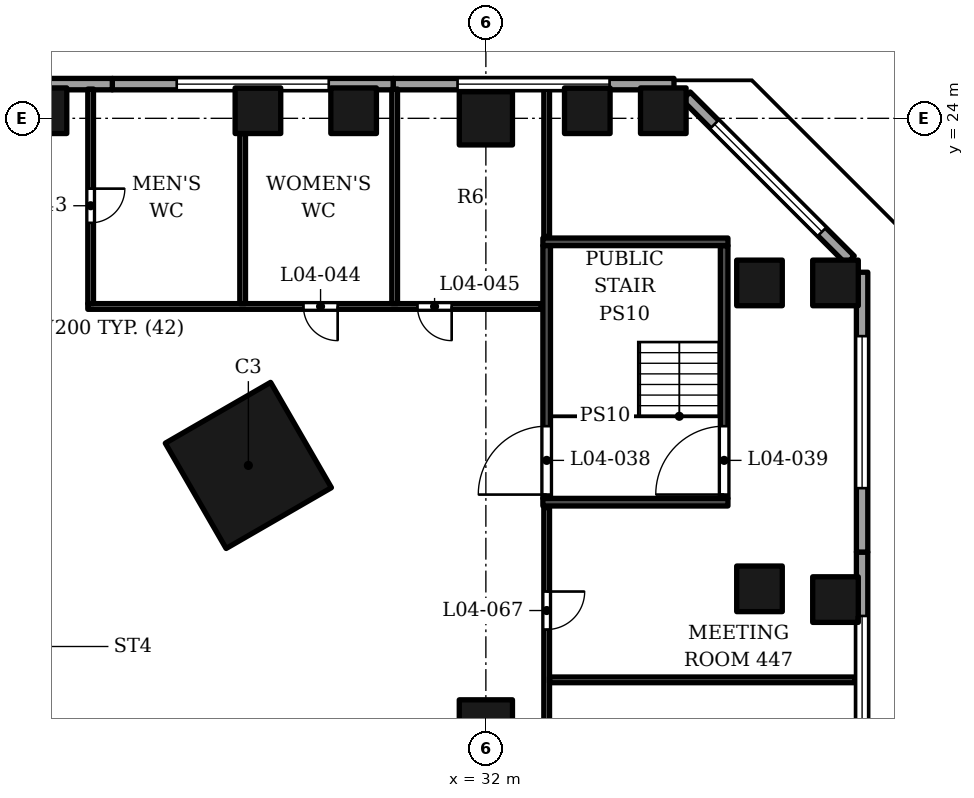
"""IFC4 building model, lengths in metres.
Left out: names, types, materials, properties, quantities, classifications, styles, units other than length and angle.
Written with IfcOpenShell. Run it as: python <this file> out.ifc"""

import sys

from ifc_helpers import new_model, si_unit, direction, frame, frame_2d, origin, origin_2d, place, context, subcontext, project, spatial, rectangle, extrude, element, fill, save


model = new_model("IFC4")
c1 = context("Model", 3, precision=1e-05, world=origin(), true_north=direction((0.0, 1.0)))
c2 = subcontext(c1, "Body", "Model", "MODEL_VIEW")
j1 = project(units=[si_unit("LENGTHUNIT", "METRE"), si_unit("PLANEANGLEUNIT", "RADIAN")], contexts=[c1])
p1 = place(None, origin())
s1 = spatial("IfcSite", under=j1, at=p1, CompositionType="ELEMENT")
p2 = place(p1, origin())
s2 = spatial("IfcBuilding", under=s1, at=p2, CompositionType="ELEMENT")
p3 = place(p2, frame((0.0, 0.0, 34.5)))
s3 = spatial("IfcBuildingStorey", under=s2, at=p3, CompositionType="ELEMENT", Elevation=34.5)
for number, where, z_axis, x_axis in (
    (1, (32.0, 8.0, 0.0), (0.0, 0.0, 1.0), (1.0, 0.0, 0.0)),
    (2, (32.0, 24.0, 0.0), (0.0, 0.0, 1.0), (1.0, 0.0, 0.0)),
):
    element("IfcColumn", number, at=place(p3, frame(where, z_axis=z_axis, x_axis=x_axis)), inside=s3, PredefinedType="COLUMN", context=c2, shape_type="SweptSolid", body=[
        extrude(rectangle(XDim=1.4, YDim=1.4, at=origin_2d()), origin(), (0.0, 0.0, 1.0), 5.5),
    ])
for number, where, z_axis, x_axis in (
    (3, (34.669, 24.2, 0.0), (0.0, 0.0, 1.0), (1.0, 0.0, 0.0)),
    (4, (39.2, 19.669, 0.0), (0.0, 0.0, 1.0), (1.0, 0.0, 0.0)),
    (5, (26.002, 24.2, 0.0), (0.0, 0.0, 1.0), (1.0, 0.0, 0.0)),
    (6, (39.2, 11.62, 0.0), (0.0, 0.0, 1.0), (1.0, 0.0, 0.0)),
    (7, (36.669, 24.2, 0.0), (0.0, 0.0, 1.0), (1.0, 0.0, 0.0)),
    (8, (41.2, 19.669, 0.0), (0.0, 0.0, 1.0), (1.0, 0.0, 0.0)),
    (9, (20.372, 24.2, 0.0), (0.0, 0.0, 1.0), (1.0, 0.0, 0.0)),
    (10, (28.52, 24.2, 0.0), (0.0, 0.0, 1.0), (1.0, 0.0, 0.0)),
    (11, (41.2, 11.337, 0.0), (0.0, 0.0, 1.0), (1.0, 0.0, 0.0)),
):
    element("IfcColumn", number, at=place(p3, frame(where, z_axis=z_axis, x_axis=x_axis)), inside=s3, PredefinedType="COLUMN", context=c2, shape_type="SweptSolid", body=[
        extrude(rectangle(XDim=1.2, YDim=1.2, at=origin_2d()), origin(), (0.0, 0.0, 1.0), 5.5),
    ])
p4 = place(p3, frame((25.75, 14.867, 0.0), z_axis=(0.0, 0.0, 1.0), x_axis=(-0.866025386331, -0.50000003023, 0.0)))
e12 = element("IfcColumn", 12, at=p4, inside=s3, PredefinedType="COLUMN", context=c2, shape_type="SweptSolid", body=[
    extrude(rectangle(XDim=3.2, YDim=3.2, at=origin_2d()), origin(), (0.0, 0.0, 1.0), 5.5),
])
p5 = place(p3, frame((41.9, 5.225, 0.0), z_axis=(0.0, 0.0, 1.0), x_axis=(0.0, 1.0, 0.0)))
e13 = element("IfcWall", 13, at=p5, inside=s3, PredefinedType="SOLIDWALL", context=c2, shape_type="SweptSolid", body=[
    extrude(rectangle(XDim=7.362, YDim=0.3, at=frame_2d((3.681, 0.0))), origin(), (0.0, 0.0, 1.0), 4.1),
])
p6 = place(p5, frame((1.681, 0.0, 1.0)))
e14 = element("IfcOpeningElement", 14, at=p6, cuts=e13, PredefinedType="OPENING", context=c2, shape_type="SweptSolid", body=[
    extrude(rectangle(XDim=4.0, YDim=1.8, at=frame_2d((2.0, 0.9))), frame((0.0, 0.16, 0.0), z_axis=(0.0, -1.0, 0.0), x_axis=(1.0, 0.0, 0.0)), (0.0, 0.0, 1.0), 0.32),
])
p7 = place(p3, frame((41.9, 12.587, 0.0), z_axis=(0.0, 0.0, 1.0), x_axis=(0.0, 1.0, 0.0)))
e15 = element("IfcWall", 15, at=p7, inside=s3, PredefinedType="SOLIDWALL", context=c2, shape_type="SweptSolid", body=[
    extrude(rectangle(XDim=7.363, YDim=0.3, at=frame_2d((3.681, 0.0))), origin(), (0.0, 0.0, 1.0), 4.1),
])
p8 = place(p7, frame((1.681, 0.0, 1.0)))
e16 = element("IfcOpeningElement", 16, at=p8, cuts=e15, PredefinedType="OPENING", context=c2, shape_type="SweptSolid", body=[
    extrude(rectangle(XDim=4.0, YDim=1.8, at=frame_2d((2.0, 0.9))), frame((0.0, 0.16, 0.0), z_axis=(0.0, -1.0, 0.0), x_axis=(1.0, 0.0, 0.0)), (0.0, 0.0, 1.0), 0.32),
])
p9 = place(p3, frame((41.588, 20.271, 0.0), z_axis=(0.0, 0.0, 1.0), x_axis=(-0.707106781187, 0.707106781187, 0.0)))
e17 = element("IfcWall", 17, at=p9, inside=s3, PredefinedType="SOLIDWALL", context=c2, shape_type="SweptSolid", body=[
    extrude(rectangle(XDim=6.105, YDim=0.3, at=frame_2d((3.052, 0.0))), origin(), (0.0, 0.0, 1.0), 4.1),
])
p10 = place(p9, frame((1.052, 0.0, 1.0)))
e18 = element("IfcOpeningElement", 18, at=p10, cuts=e17, PredefinedType="OPENING", context=c2, shape_type="SweptSolid", body=[
    extrude(rectangle(XDim=4.0, YDim=1.8, at=frame_2d((2.0, 0.9))), frame((0.0, 0.16, 0.0), z_axis=(0.0, -1.0, 0.0), x_axis=(1.0, 0.0, 0.0)), (0.0, 0.0, 1.0), 0.32),
])
p11 = place(p3, frame((36.95, 24.9, 0.0), z_axis=(0.0, 0.0, 1.0), x_axis=(-1.0, 0.0, 0.0)))
e19 = element("IfcWall", 19, at=p11, inside=s3, PredefinedType="SOLIDWALL", context=c2, shape_type="SweptSolid", body=[
    extrude(rectangle(XDim=7.39, YDim=0.3, at=frame_2d((3.695, 0.0))), origin(), (0.0, 0.0, 1.0), 4.1),
])
p12 = place(p11, frame((1.695, 0.0, 1.0)))
e20 = element("IfcOpeningElement", 20, at=p12, cuts=e19, PredefinedType="OPENING", context=c2, shape_type="SweptSolid", body=[
    extrude(rectangle(XDim=4.0, YDim=1.8, at=frame_2d((2.0, 0.9))), frame((0.0, 0.16, 0.0), z_axis=(0.0, -1.0, 0.0), x_axis=(1.0, 0.0, 0.0)), (0.0, 0.0, 1.0), 0.32),
])
p13 = place(p3, frame((29.56, 24.9, 0.0), z_axis=(0.0, 0.0, 1.0), x_axis=(-1.0, 0.0, 0.0)))
e21 = element("IfcWall", 21, at=p13, inside=s3, PredefinedType="SOLIDWALL", context=c2, shape_type="SweptSolid", body=[
    extrude(rectangle(XDim=7.39, YDim=0.3, at=frame_2d((3.695, 0.0))), origin(), (0.0, 0.0, 1.0), 4.1),
])
p14 = place(p13, frame((1.695, 0.0, 1.0)))
e22 = element("IfcOpeningElement", 22, at=p14, cuts=e21, PredefinedType="OPENING", context=c2, shape_type="SweptSolid", body=[
    extrude(rectangle(XDim=4.0, YDim=1.8, at=frame_2d((2.0, 0.9))), frame((0.0, 0.16, 0.0), z_axis=(0.0, -1.0, 0.0), x_axis=(1.0, 0.0, 0.0)), (0.0, 0.0, 1.0), 0.32),
])
p15 = place(p3, frame((22.17, 24.9, 0.0), z_axis=(0.0, 0.0, 1.0), x_axis=(-1.0, 0.0, 0.0)))
e23 = element("IfcWall", 23, at=p15, inside=s3, PredefinedType="SOLIDWALL", context=c2, shape_type="SweptSolid", body=[
    extrude(rectangle(XDim=7.39, YDim=0.3, at=frame_2d((3.695, 0.0))), origin(), (0.0, 0.0, 1.0), 4.1),
])
p16 = place(p15, frame((1.695, 0.0, 1.0)))
e24 = element("IfcOpeningElement", 24, at=p16, cuts=e23, PredefinedType="OPENING", context=c2, shape_type="SweptSolid", body=[
    extrude(rectangle(XDim=4.0, YDim=1.8, at=frame_2d((2.0, 0.9))), frame((0.0, 0.16, 0.0), z_axis=(0.0, -1.0, 0.0), x_axis=(1.0, 0.0, 0.0)), (0.0, 0.0, 1.0), 0.32),
])
p17 = place(p3, frame((41.85, 5.302, 5.5), z_axis=(0.0, 0.0, 1.0), x_axis=(0.0, 1.0, 0.0)))
e25 = element("IfcWall", 25, at=p17, inside=s3, PredefinedType="PARAPET", context=c2, shape_type="SweptSolid", body=[
    extrude(rectangle(XDim=14.698, YDim=0.3, at=frame_2d((7.349, 0.0))), origin(), (0.0, 0.0, 1.0), 1.1),
])
p18 = place(p3, frame((41.745, 20.042, 5.5), z_axis=(0.0, 0.0, 1.0), x_axis=(-0.70708898898, 0.707124572946, 0.0)))
e26 = element("IfcWall", 26, at=p18, inside=s3, PredefinedType="PARAPET", context=c2, shape_type="SweptSolid", body=[
    extrude(rectangle(XDim=6.861, YDim=0.3, at=frame_2d((3.431, 0.0))), origin(), (0.0, 0.0, 1.0), 1.1),
])
p19 = place(p3, frame((36.79, 24.85, 5.5), z_axis=(0.0, 0.0, 1.0), x_axis=(-1.0, 0.0, 0.0)))
e27 = element("IfcWall", 27, at=p19, inside=s3, PredefinedType="PARAPET", context=c2, shape_type="SweptSolid", body=[
    extrude(rectangle(XDim=1.04, YDim=0.3, at=frame_2d((0.52, 0.0))), origin(), (0.0, 0.0, 1.0), 1.1),
])
for number, where, z_axis, x_axis in (
    (28, (33.5, 13.9, 0.0), (0.0, 0.0, 1.0), (1.0, 0.0, 0.0)),
    (29, (33.5, 20.75, 0.0), (0.0, 0.0, 1.0), (1.0, 0.0, 0.0)),
):
    element("IfcWall", number, at=place(p3, frame(where, z_axis=z_axis, x_axis=x_axis)), inside=s3, PredefinedType="SOLIDWALL", context=c2, shape_type="SweptSolid", body=[
        extrude(rectangle(XDim=4.87, YDim=0.2, at=frame_2d((2.435, 0.0))), origin(), (0.0, 0.0, 1.0), 5.05),
    ])
p20 = place(p3, frame((33.6, 14.0, 0.0), z_axis=(0.0, 0.0, 1.0), x_axis=(0.0, 1.0, 0.0)))
e30 = element("IfcWall", 30, at=p20, inside=s3, PredefinedType="SOLIDWALL", context=c2, shape_type="SweptSolid", body=[
    extrude(rectangle(XDim=6.65, YDim=0.2, at=frame_2d((3.325, 0.0))), origin(), (0.0, 0.0, 1.0), 5.05),
])
p21 = place(p20, frame((0.1, 0.0, 0.0)))
e31 = element("IfcOpeningElement", 31, at=p21, cuts=e30, PredefinedType="OPENING", context=c2, shape_type="SweptSolid", body=[
    extrude(rectangle(XDim=1.8, YDim=2.4, at=frame_2d((0.9, 1.2))), frame((0.0, 0.11, 0.0), z_axis=(0.0, -1.0, 0.0), x_axis=(1.0, 0.0, 0.0)), (0.0, 0.0, 1.0), 0.22),
])
p22 = place(p3, frame((38.27, 14.0, 0.0), z_axis=(0.0, 0.0, 1.0), x_axis=(0.0, 1.0, 0.0)))
e32 = element("IfcWall", 32, at=p22, inside=s3, PredefinedType="SOLIDWALL", context=c2, shape_type="SweptSolid", body=[
    extrude(rectangle(XDim=6.65, YDim=0.2, at=frame_2d((3.325, 0.0))), origin(), (0.0, 0.0, 1.0), 5.05),
])
p23 = place(p22, frame((0.1, 0.0, 0.0)))
e33 = element("IfcOpeningElement", 33, at=p23, cuts=e32, PredefinedType="OPENING", context=c2, shape_type="SweptSolid", body=[
    extrude(rectangle(XDim=1.8, YDim=2.4, at=frame_2d((0.9, 1.2))), frame((0.0, 0.11, 0.0), z_axis=(0.0, -1.0, 0.0), x_axis=(1.0, 0.0, 0.0)), (0.0, 0.0, 1.0), 0.22),
])
p24 = place(p3, frame((33.6, 4.69, 0.0), z_axis=(0.0, 0.0, 1.0), x_axis=(0.0, 1.0, 0.0)))
e34 = element("IfcWall", 34, at=p24, inside=s3, PredefinedType="PARTITIONING", context=c2, shape_type="SweptSolid", body=[
    extrude(rectangle(XDim=9.07, YDim=0.15, at=frame_2d((4.535, 0.0))), origin(), (0.0, 0.0, 1.0), 3.85),
])
p25 = place(p24, frame((0.385, 0.0, 0.0)))
e35 = element("IfcOpeningElement", 35, at=p25, cuts=e34, PredefinedType="OPENING", context=c2, shape_type="SweptSolid", body=[
    extrude(rectangle(XDim=1.0, YDim=2.1, at=frame_2d((0.5, 1.05))), frame((0.0, 0.085, 0.0), z_axis=(0.0, -1.0, 0.0), x_axis=(1.0, 0.0, 0.0)), (0.0, 0.0, 1.0), 0.17),
])
p26 = place(p24, frame((5.859, 0.0, 0.0)))
e36 = element("IfcOpeningElement", 36, at=p26, cuts=e34, PredefinedType="OPENING", context=c2, shape_type="SweptSolid", body=[
    extrude(rectangle(XDim=1.0, YDim=2.1, at=frame_2d((0.5, 1.05))), frame((0.0, 0.085, 0.0), z_axis=(0.0, -1.0, 0.0), x_axis=(1.0, 0.0, 0.0)), (0.0, 0.0, 1.0), 0.17),
])
p27 = place(p3, frame((33.675, 9.225, 0.0), z_axis=(0.0, 0.0, 1.0), x_axis=(1.0, 0.0, 0.0)))
e37 = element("IfcWall", 37, at=p27, inside=s3, PredefinedType="PARTITIONING", context=c2, shape_type="SweptSolid", body=[
    extrude(rectangle(XDim=8.045, YDim=0.15, at=frame_2d((4.022, 0.0))), origin(), (0.0, 0.0, 1.0), 4.15),
])
p28 = place(p3, frame((21.525, 19.05, 0.0), z_axis=(0.0, 0.0, 1.0), x_axis=(1.0, 0.0, 0.0)))
e38 = element("IfcWall", 38, at=p28, inside=s3, PredefinedType="PARTITIONING", context=c2, shape_type="SweptSolid", body=[
    extrude(rectangle(XDim=11.935, YDim=0.15, at=frame_2d((5.968, 0.0))), origin(), (0.0, 0.0, 1.0), 3.85),
])
p29 = place(p28, frame((5.675, 0.0, 0.0)))
e39 = element("IfcOpeningElement", 39, at=p29, cuts=e38, PredefinedType="OPENING", context=c2, shape_type="SweptSolid", body=[
    extrude(rectangle(XDim=0.9, YDim=2.1, at=frame_2d((0.45, 1.05))), frame((0.0, 0.085, 0.0), z_axis=(0.0, -1.0, 0.0), x_axis=(1.0, 0.0, 0.0)), (0.0, 0.0, 1.0), 0.17),
])
p30 = place(p28, frame((8.675, 0.0, 0.0)))
e40 = element("IfcOpeningElement", 40, at=p30, cuts=e38, PredefinedType="OPENING", context=c2, shape_type="SweptSolid", body=[
    extrude(rectangle(XDim=0.9, YDim=2.1, at=frame_2d((0.45, 1.05))), frame((0.0, 0.085, 0.0), z_axis=(0.0, -1.0, 0.0), x_axis=(1.0, 0.0, 0.0)), (0.0, 0.0, 1.0), 0.17),
])
p31 = place(p3, frame((21.6, 19.125, 0.0), z_axis=(0.0, 0.0, 1.0), x_axis=(0.0, 1.0, 0.0)))
e41 = element("IfcWall", 41, at=p31, inside=s3, PredefinedType="PARTITIONING", context=c2, shape_type="SweptSolid", body=[
    extrude(rectangle(XDim=5.645, YDim=0.15, at=frame_2d((2.823, 0.0))), origin(), (0.0, 0.0, 1.0), 3.85),
])
p32 = place(p31, frame((2.125, 0.0, 0.0)))
e42 = element("IfcOpeningElement", 42, at=p32, cuts=e41, PredefinedType="OPENING", context=c2, shape_type="SweptSolid", body=[
    extrude(rectangle(XDim=0.9, YDim=2.1, at=frame_2d((0.45, 1.05))), frame((0.0, 0.085, 0.0), z_axis=(0.0, -1.0, 0.0), x_axis=(1.0, 0.0, 0.0)), (0.0, 0.0, 1.0), 0.17),
])
p33 = place(p3, frame((25.6, 19.125, 0.0), z_axis=(0.0, 0.0, 1.0), x_axis=(0.0, 1.0, 0.0)))
e43 = element("IfcWall", 43, at=p33, inside=s3, PredefinedType="PARTITIONING", context=c2, shape_type="SweptSolid", body=[
    extrude(rectangle(XDim=4.475, YDim=0.15, at=frame_2d((2.238, 0.0))), origin(), (0.0, 0.0, 1.0), 5.05),
])
p34 = place(p3, frame((29.6, 19.125, 0.0), z_axis=(0.0, 0.0, 1.0), x_axis=(0.0, 1.0, 0.0)))
e44 = element("IfcWall", 44, at=p34, inside=s3, PredefinedType="PARTITIONING", context=c2, shape_type="SweptSolid", body=[
    extrude(rectangle(XDim=5.645, YDim=0.15, at=frame_2d((2.823, 0.0))), origin(), (0.0, 0.0, 1.0), 3.85),
])
p35 = place(p3, frame((33.6, 20.89, 0.0), z_axis=(0.0, 0.0, 1.0), x_axis=(0.0, 1.0, 0.0)))
e45 = element("IfcWall", 45, at=p35, inside=s3, PredefinedType="PARTITIONING", context=c2, shape_type="SweptSolid", body=[
    extrude(rectangle(XDim=3.88, YDim=0.15, at=frame_2d((1.94, 0.0))), origin(), (0.0, 0.0, 1.0), 5.05),
])
p36 = place(p6, origin())
e46 = element("IfcWindow", 46, at=p36, inside=s3, PartitioningType="SINGLE_PANEL", PredefinedType="WINDOW", context=c2, shape_type="SweptSolid", body=[
    extrude(rectangle(XDim=4.0, YDim=1.8, at=frame_2d((2.0, 0.9))), frame((0.0, 0.03, 0.0), z_axis=(0.0, -1.0, 0.0), x_axis=(1.0, 0.0, 0.0)), (0.0, 0.0, 1.0), 0.06),
])
fill(e14, e46)
p37 = place(p8, origin())
e47 = element("IfcWindow", 47, at=p37, inside=s3, PartitioningType="SINGLE_PANEL", PredefinedType="WINDOW", context=c2, shape_type="SweptSolid", body=[
    extrude(rectangle(XDim=4.0, YDim=1.8, at=frame_2d((2.0, 0.9))), frame((0.0, 0.03, 0.0), z_axis=(0.0, -1.0, 0.0), x_axis=(1.0, 0.0, 0.0)), (0.0, 0.0, 1.0), 0.06),
])
fill(e16, e47)
p38 = place(p10, origin())
e48 = element("IfcWindow", 48, at=p38, inside=s3, PartitioningType="SINGLE_PANEL", PredefinedType="WINDOW", context=c2, shape_type="SweptSolid", body=[
    extrude(rectangle(XDim=4.0, YDim=1.8, at=frame_2d((2.0, 0.9))), frame((0.0, 0.03, 0.0), z_axis=(0.0, -1.0, 0.0), x_axis=(1.0, 0.0, 0.0)), (0.0, 0.0, 1.0), 0.06),
])
fill(e18, e48)
p39 = place(p12, origin())
e49 = element("IfcWindow", 49, at=p39, inside=s3, PartitioningType="SINGLE_PANEL", PredefinedType="WINDOW", context=c2, shape_type="SweptSolid", body=[
    extrude(rectangle(XDim=4.0, YDim=1.8, at=frame_2d((2.0, 0.9))), frame((0.0, 0.03, 0.0), z_axis=(0.0, -1.0, 0.0), x_axis=(1.0, 0.0, 0.0)), (0.0, 0.0, 1.0), 0.06),
])
fill(e20, e49)
p40 = place(p14, origin())
e50 = element("IfcWindow", 50, at=p40, inside=s3, PartitioningType="SINGLE_PANEL", PredefinedType="WINDOW", context=c2, shape_type="SweptSolid", body=[
    extrude(rectangle(XDim=4.0, YDim=1.8, at=frame_2d((2.0, 0.9))), frame((0.0, 0.03, 0.0), z_axis=(0.0, -1.0, 0.0), x_axis=(1.0, 0.0, 0.0)), (0.0, 0.0, 1.0), 0.06),
])
fill(e22, e50)
p41 = place(p21, origin())
e51 = element("IfcDoor", 51, at=p41, inside=s3, OperationType="DOUBLE_DOOR_SINGLE_SWING", PredefinedType="DOOR", context=c2, shape_type="SweptSolid", body=[
    extrude(rectangle(XDim=1.8, YDim=2.4, at=frame_2d((0.9, 1.2))), frame((0.0, 0.025, 0.0), z_axis=(0.0, -1.0, 0.0), x_axis=(1.0, 0.0, 0.0)), (0.0, 0.0, 1.0), 0.05),
])
fill(e31, e51)
p42 = place(p23, origin())
e52 = element("IfcDoor", 52, at=p42, inside=s3, OperationType="DOUBLE_DOOR_SINGLE_SWING", PredefinedType="DOOR", context=c2, shape_type="SweptSolid", body=[
    extrude(rectangle(XDim=1.8, YDim=2.4, at=frame_2d((0.9, 1.2))), frame((0.0, 0.025, 0.0), z_axis=(0.0, -1.0, 0.0), x_axis=(1.0, 0.0, 0.0)), (0.0, 0.0, 1.0), 0.05),
])
fill(e33, e52)
p43 = place(p32, origin())
e53 = element("IfcDoor", 53, at=p43, inside=s3, OperationType="SINGLE_SWING_RIGHT", PredefinedType="DOOR", context=c2, shape_type="SweptSolid", body=[
    extrude(rectangle(XDim=0.9, YDim=2.1, at=frame_2d((0.45, 1.05))), frame((0.0, 0.025, 0.0), z_axis=(0.0, -1.0, 0.0), x_axis=(1.0, 0.0, 0.0)), (0.0, 0.0, 1.0), 0.05),
])
fill(e42, e53)
p44 = place(p29, origin())
e54 = element("IfcDoor", 54, at=p44, inside=s3, OperationType="SINGLE_SWING_RIGHT", PredefinedType="DOOR", context=c2, shape_type="SweptSolid", body=[
    extrude(rectangle(XDim=0.9, YDim=2.1, at=frame_2d((0.45, 1.05))), frame((0.0, 0.025, 0.0), z_axis=(0.0, -1.0, 0.0), x_axis=(1.0, 0.0, 0.0)), (0.0, 0.0, 1.0), 0.05),
])
fill(e39, e54)
p45 = place(p30, origin())
e55 = element("IfcDoor", 55, at=p45, inside=s3, OperationType="SINGLE_SWING_RIGHT", PredefinedType="DOOR", context=c2, shape_type="SweptSolid", body=[
    extrude(rectangle(XDim=0.9, YDim=2.1, at=frame_2d((0.45, 1.05))), frame((0.0, 0.025, 0.0), z_axis=(0.0, -1.0, 0.0), x_axis=(1.0, 0.0, 0.0)), (0.0, 0.0, 1.0), 0.05),
])
fill(e40, e55)
p46 = place(p26, origin())
e56 = element("IfcDoor", 56, at=p46, inside=s3, OperationType="SINGLE_SWING_RIGHT", PredefinedType="DOOR", context=c2, shape_type="SweptSolid", body=[
    extrude(rectangle(XDim=1.0, YDim=2.1, at=frame_2d((0.5, 1.05))), frame((0.0, 0.025, 0.0), z_axis=(0.0, -1.0, 0.0), x_axis=(1.0, 0.0, 0.0)), (0.0, 0.0, 1.0), 0.05),
])
fill(e36, e56)
save(model, sys.argv[1])
